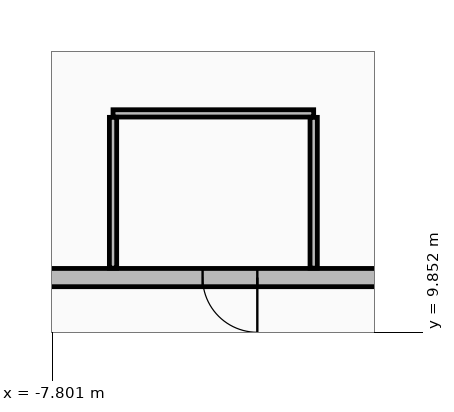
"""IFC4 building model, lengths in metres.
Left out: names, types, materials, properties, quantities, classifications, styles, units other than length and angle.
Written with IfcOpenShell. Run it as: python <this file> out.ifc"""

import sys

from ifc_helpers import new_model, si_unit, direction, frame, frame_2d, origin, place, context, subcontext, project, spatial, rectangle, extrude, element, fill, save


model = new_model("IFC4")
c1 = context("Model", 3, precision=1e-05, world=origin(), true_north=direction((0.0, 1.0)))
c2 = subcontext(c1, "Body", "Model", "MODEL_VIEW")
j1 = project(units=[si_unit("LENGTHUNIT", "METRE"), si_unit("PLANEANGLEUNIT", "RADIAN")], contexts=[c1])
p1 = place(None, origin())
s1 = spatial("IfcSite", under=j1, at=p1, CompositionType="ELEMENT")
p2 = place(p1, origin())
s2 = spatial("IfcBuilding", under=s1, at=p2, CompositionType="ELEMENT")
p3 = place(p2, frame((0.0, 0.0, 81.1)))
s3 = spatial("IfcBuildingStorey", under=s2, at=p3, CompositionType="ELEMENT", Elevation=81.1)
p4 = place(p3, frame((12.05, 10.75, 0.0), z_axis=(0.0, 0.0, 1.0), x_axis=(-1.0, 0.0, 0.0)))
e1 = element("IfcWall", 1, at=p4, inside=s3, PredefinedType="STANDARD", context=c2, shape_type="SweptSolid", body=[
    extrude(rectangle(XDim=24.1, YDim=0.3, at=frame_2d((12.05, 0.0))), origin(), (0.0, 0.0, 1.0), 2.505),
])
p5 = place(p4, frame((16.477, 0.0, 0.0)))
e2 = element("IfcOpeningElement", 2, at=p5, cuts=e1, PredefinedType="OPENING", context=c2, shape_type="SweptSolid", body=[
    extrude(rectangle(XDim=0.9, YDim=2.1, at=frame_2d((0.45, 1.05))), frame((0.0, 0.16, 0.0), z_axis=(0.0, -1.0, 0.0), x_axis=(1.0, 0.0, 0.0)), (0.0, 0.0, 1.0), 0.32),
])
p6 = place(p3, frame((-6.8, 13.45, 0.0), z_axis=(0.0, 0.0, 1.0), x_axis=(1.0, 0.0, 0.0)))
e3 = element("IfcWall", 3, at=p6, inside=s3, PredefinedType="PARTITIONING", context=c2, shape_type="SweptSolid", body=[
    extrude(rectangle(XDim=3.3, YDim=0.12, at=frame_2d((1.65, 0.0))), origin(), (0.0, 0.0, 1.0), 4.405),
])
p7 = place(p3, frame((-3.5, 13.385, 0.0), z_axis=(0.0, 0.0, 1.0), x_axis=(0.0, -1.0, 0.0)))
e4 = element("IfcWall", 4, at=p7, inside=s3, PredefinedType="PARTITIONING", context=c2, shape_type="SweptSolid", body=[
    extrude(rectangle(XDim=2.48, YDim=0.12, at=frame_2d((1.24, 0.0))), origin(), (0.0, 0.0, 1.0), 4.81),
])
p8 = place(p3, frame((-6.8, 10.905, 0.0), z_axis=(0.0, 0.0, 1.0), x_axis=(0.0, 1.0, 0.0)))
e5 = element("IfcWall", 5, at=p8, inside=s3, PredefinedType="PARTITIONING", context=c2, shape_type="SweptSolid", body=[
    extrude(rectangle(XDim=2.48, YDim=0.12, at=frame_2d((1.24, 0.0))), origin(), (0.0, 0.0, 1.0), 4.405),
])
p9 = place(p5, origin())
e6 = element("IfcDoor", 6, at=p9, inside=s3, OperationType="SINGLE_SWING_LEFT", PredefinedType="DOOR", context=c2, shape_type="SweptSolid", body=[
    extrude(rectangle(XDim=0.9, YDim=2.1, at=frame_2d((0.45, 1.05))), frame((0.0, 0.025, 0.0), z_axis=(0.0, -1.0, 0.0), x_axis=(1.0, 0.0, 0.0)), (0.0, 0.0, 1.0), 0.05),
])
fill(e2, e6)
save(model, sys.argv[1])
